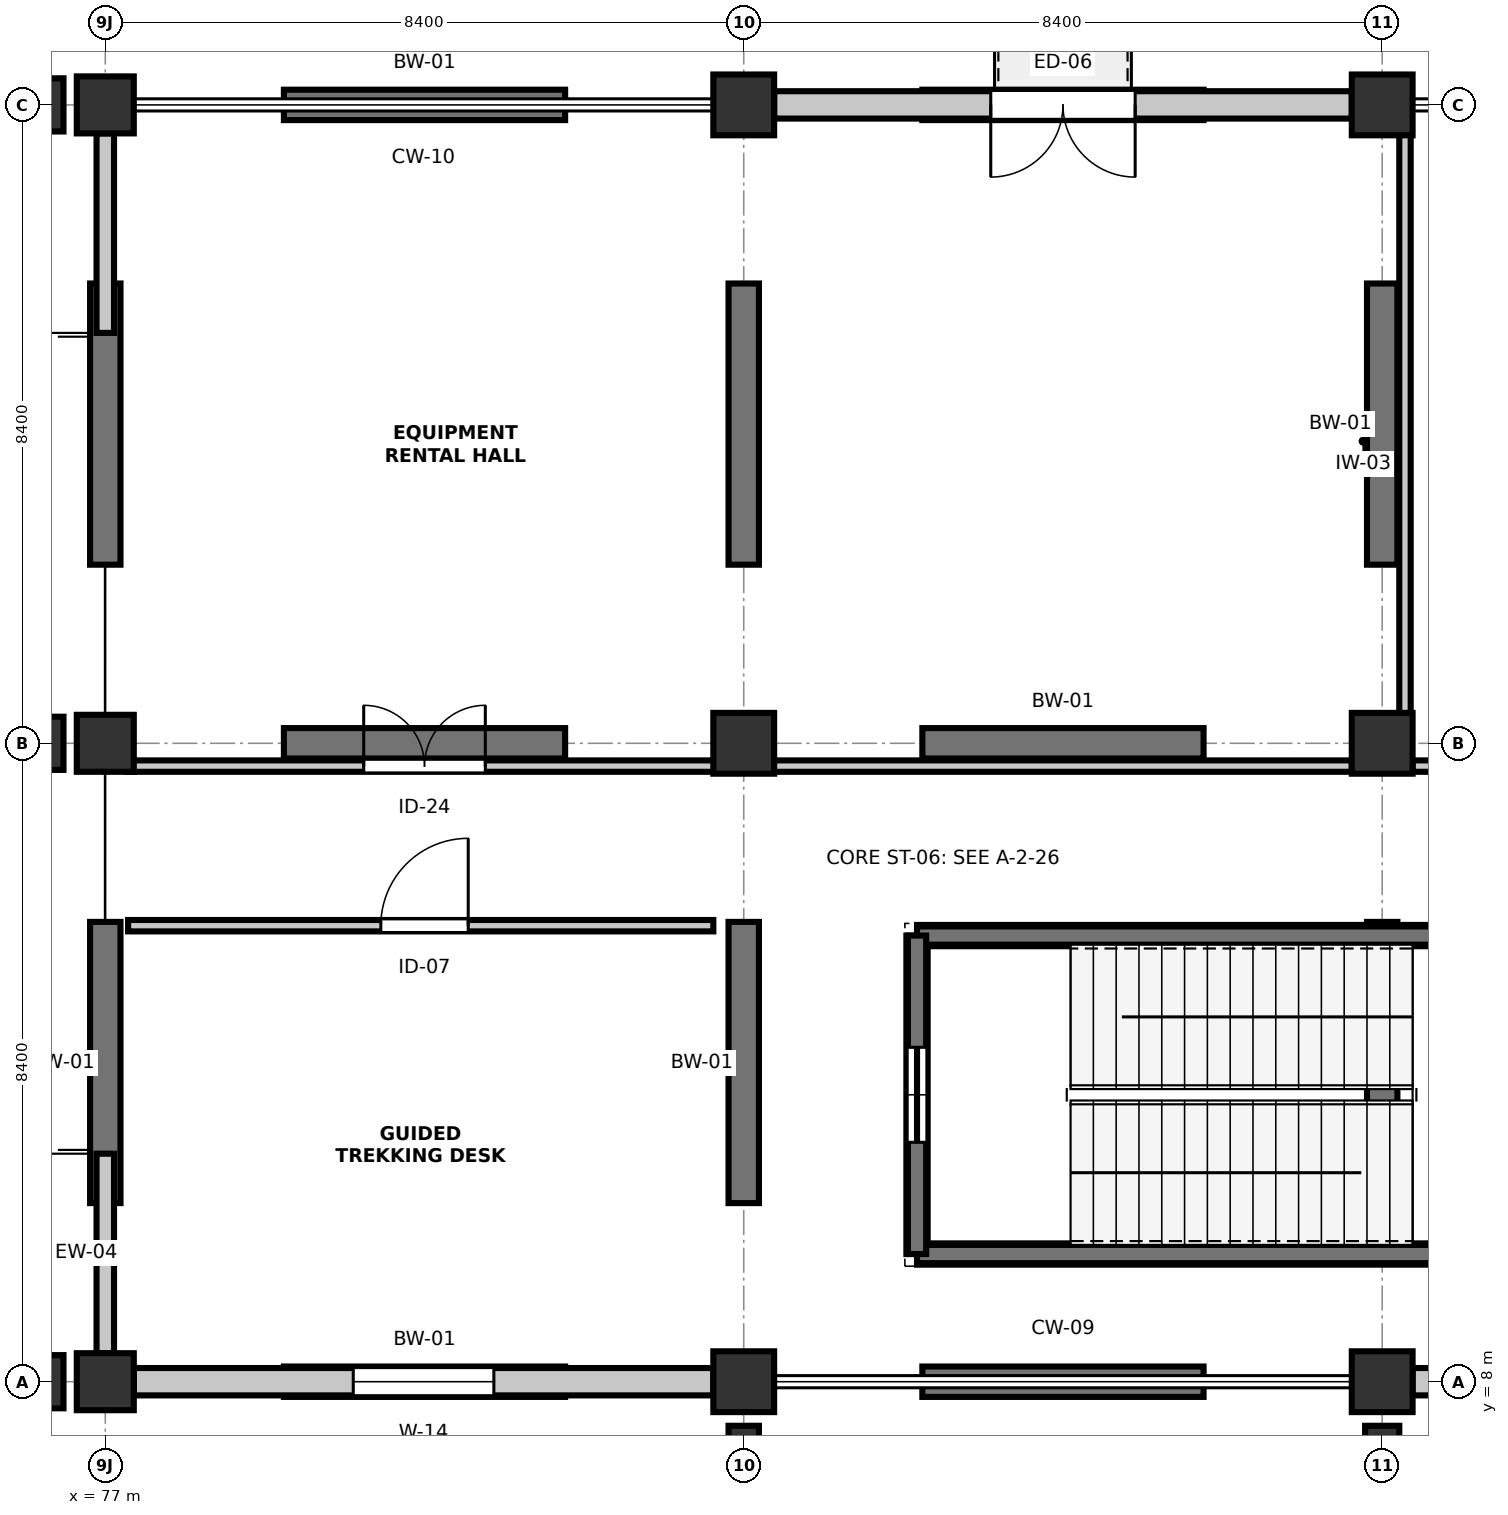
"""IFC4 building model, lengths in metres.
Left out: names, types, materials, properties, quantities, classifications, styles, units other than length and angle.
Written with IfcOpenShell. Run it as: python <this file> out.ifc"""

import sys

from ifc_helpers import new_model, si_unit, direction, frame, frame_2d, origin, origin_2d, place, context, subcontext, project, spatial, rectangle, extrude, element, fill, save


model = new_model("IFC4")
c1 = context("Model", 3, precision=1e-05, world=origin(), true_north=direction((0.0, 1.0)))
c2 = subcontext(c1, "Body", "Model", "MODEL_VIEW")
j1 = project(units=[si_unit("LENGTHUNIT", "METRE"), si_unit("PLANEANGLEUNIT", "RADIAN")], contexts=[c1])
p1 = place(None, origin())
s1 = spatial("IfcSite", under=j1, at=p1, CompositionType="ELEMENT")
p2 = place(p1, origin())
s2 = spatial("IfcBuilding", under=s1, at=p2, CompositionType="ELEMENT")
p3 = place(p2, frame((0.0, 0.0, 4.8)))
s3 = spatial("IfcBuildingStorey", under=s2, at=p3, CompositionType="ELEMENT", Elevation=4.8)
for number, where, z_axis, x_axis in (
    (1, (76.1, 8.0, 0.0), (0.0, 0.0, 1.0), (1.0, 0.0, 0.0)),
    (2, (76.1, 16.4, 0.0), (0.0, 0.0, 1.0), (1.0, 0.0, 0.0)),
    (3, (76.1, 24.8, 0.0), (0.0, 0.0, 1.0), (1.0, 0.0, 0.0)),
):
    element("IfcColumn", number, at=place(p3, frame(where, z_axis=z_axis, x_axis=x_axis)), inside=s3, PredefinedType="COLUMN", context=c2, shape_type="SweptSolid", body=[
        extrude(rectangle(XDim=0.7, YDim=0.7, at=origin_2d()), origin(), (0.0, 0.0, 1.0), 4.8),
    ])
for number, where, z_axis, x_axis in (
    (4, (77.0, 8.0, 0.0), (0.0, 0.0, 1.0), (1.0, 0.0, 0.0)),
    (5, (77.0, 16.4, 0.0), (0.0, 0.0, 1.0), (1.0, 0.0, 0.0)),
    (6, (77.0, 24.8, 0.0), (0.0, 0.0, 1.0), (1.0, 0.0, 0.0)),
):
    element("IfcColumn", number, at=place(p3, frame(where, z_axis=z_axis, x_axis=x_axis)), inside=s3, PredefinedType="COLUMN", context=c2, shape_type="SweptSolid", body=[
        extrude(rectangle(XDim=0.75, YDim=0.75, at=origin_2d()), origin(), (0.0, 0.0, 1.0), 4.8),
    ])
p4 = place(p3, frame((85.4, 8.0, 0.0), z_axis=(0.0, 0.0, 1.0), x_axis=(1.0, 0.0, 0.0)))
e7 = element("IfcColumn", 7, at=p4, inside=s3, PredefinedType="COLUMN", context=c2, shape_type="SweptSolid", body=[
    extrude(rectangle(XDim=0.8, YDim=0.8, at=origin_2d()), origin(), (0.0, 0.0, 1.0), 4.8),
])
p5 = place(p3, frame((85.4, 7.095, 0.0), z_axis=(0.0, 0.0, 1.0), x_axis=(1.0, 0.0, 0.0)))
e8 = element("IfcColumn", 8, at=p5, inside=s3, PredefinedType="PILASTER", context=c2, shape_type="SweptSolid", body=[
    extrude(rectangle(XDim=0.4, YDim=0.65, at=origin_2d()), origin(), (0.0, 0.0, 1.0), 4.8),
])
for number, where, z_axis, x_axis in (
    (9, (85.4, 16.4, 0.0), (0.0, 0.0, 1.0), (1.0, 0.0, 0.0)),
    (10, (85.4, 24.8, 0.0), (0.0, 0.0, 1.0), (1.0, 0.0, 0.0)),
    (11, (93.8, 8.0, 0.0), (0.0, 0.0, 1.0), (1.0, 0.0, 0.0)),
):
    element("IfcColumn", number, at=place(p3, frame(where, z_axis=z_axis, x_axis=x_axis)), inside=s3, PredefinedType="COLUMN", context=c2, shape_type="SweptSolid", body=[
        extrude(rectangle(XDim=0.8, YDim=0.8, at=origin_2d()), origin(), (0.0, 0.0, 1.0), 4.8),
    ])
p6 = place(p3, frame((93.8, 7.045, 0.0), z_axis=(0.0, 0.0, 1.0), x_axis=(1.0, 0.0, 0.0)))
e12 = element("IfcColumn", 12, at=p6, inside=s3, PredefinedType="PILASTER", context=c2, shape_type="SweptSolid", body=[
    extrude(rectangle(XDim=0.45, YDim=0.75, at=origin_2d()), origin(), (0.0, 0.0, 1.0), 4.8),
])
for number, where, z_axis, x_axis in (
    (13, (93.8, 16.4, 0.0), (0.0, 0.0, 1.0), (1.0, 0.0, 0.0)),
    (14, (93.8, 24.8, 0.0), (0.0, 0.0, 1.0), (1.0, 0.0, 0.0)),
):
    element("IfcColumn", number, at=place(p3, frame(where, z_axis=z_axis, x_axis=x_axis)), inside=s3, PredefinedType="COLUMN", context=c2, shape_type="SweptSolid", body=[
        extrude(rectangle(XDim=0.8, YDim=0.8, at=origin_2d()), origin(), (0.0, 0.0, 1.0), 4.8),
    ])
for number, where, z_axis, x_axis in (
    (15, (79.35, 8.0, -2.1), (0.0, 0.0, 1.0), (1.0, 0.0, 0.0)),
    (16, (87.75, 8.0, -2.1), (0.0, 0.0, 1.0), (1.0, 0.0, 0.0)),
    (17, (79.35, 16.4, -2.1), (0.0, 0.0, 1.0), (1.0, 0.0, 0.0)),
    (18, (87.75, 16.4, -2.1), (0.0, 0.0, 1.0), (1.0, 0.0, 0.0)),
    (19, (79.35, 24.8, -2.1), (0.0, 0.0, 1.0), (1.0, 0.0, 0.0)),
    (20, (87.75, 24.8, -2.1), (0.0, 0.0, 1.0), (1.0, 0.0, 0.0)),
    (21, (77.0, 10.35, -2.1), (0.0, 0.0, 1.0), (0.0, 1.0, 0.0)),
    (22, (77.0, 18.75, -2.1), (0.0, 0.0, 1.0), (0.0, 1.0, 0.0)),
    (23, (85.4, 10.35, -2.1), (0.0, 0.0, 1.0), (0.0, 1.0, 0.0)),
    (24, (85.4, 18.75, -2.1), (0.0, 0.0, 1.0), (0.0, 1.0, 0.0)),
):
    element("IfcWall", number, at=place(p3, frame(where, z_axis=z_axis, x_axis=x_axis)), inside=s3, PredefinedType="SOLIDWALL", context=c2, shape_type="SweptSolid", body=[
        extrude(rectangle(XDim=3.7, YDim=0.4, at=frame_2d((1.85, 0.0))), origin(), (0.0, 0.0, 1.0), 1.85),
    ])
p7 = place(p3, frame((93.8, 9.82, -2.1), z_axis=(0.0, 0.0, 1.0), x_axis=(0.0, 1.0, 0.0)))
e25 = element("IfcWall", 25, at=p7, inside=s3, PredefinedType="SOLIDWALL", context=c2, shape_type="SweptSolid", body=[
    extrude(rectangle(XDim=4.23, YDim=0.4, at=frame_2d((2.115, 0.0))), origin(), (0.0, 0.0, 1.0), 1.85),
])
p8 = place(p3, frame((93.8, 18.75, -2.1), z_axis=(0.0, 0.0, 1.0), x_axis=(0.0, 1.0, 0.0)))
e26 = element("IfcWall", 26, at=p8, inside=s3, PredefinedType="SOLIDWALL", context=c2, shape_type="SweptSolid", body=[
    extrude(rectangle(XDim=3.7, YDim=0.4, at=frame_2d((1.85, 0.0))), origin(), (0.0, 0.0, 1.0), 1.85),
])
for number, where, z_axis, x_axis in (
    (27, (87.68, 9.68, -2.1), (0.0, 0.0, 1.0), (1.0, 0.0, 0.0)),
    (28, (96.22, 13.87, -2.1), (0.0, 0.0, 1.0), (-1.0, 0.0, 0.0)),
):
    element("IfcWall", number, at=place(p3, frame(where, z_axis=z_axis, x_axis=x_axis)), inside=s3, PredefinedType="SOLIDWALL", context=c2, shape_type="SweptSolid", body=[
        extrude(rectangle(XDim=8.54, YDim=0.28, at=frame_2d((4.27, 0.0))), origin(), (0.0, 0.0, 1.0), 1.8),
    ])
p9 = place(p3, frame((87.68, 13.87, -2.1), z_axis=(0.0, 0.0, 1.0), x_axis=(0.0, -1.0, 0.0)))
e29 = element("IfcWall", 29, at=p9, inside=s3, PredefinedType="SOLIDWALL", context=c2, shape_type="SweptSolid", body=[
    extrude(rectangle(XDim=4.19, YDim=0.28, at=frame_2d((2.095, 0.0))), origin(), (0.0, 0.0, 1.0), 1.8),
])
p10 = place(p3, frame((77.375, 8.0, 0.0), z_axis=(0.0, 0.0, 1.0), x_axis=(1.0, 0.0, 0.0)))
e30 = element("IfcWall", 30, at=p10, inside=s3, PredefinedType="STANDARD", context=c2, shape_type="SweptSolid", body=[
    extrude(rectangle(XDim=7.625, YDim=0.36, at=frame_2d((3.812, 0.0))), origin(), (0.0, 0.0, 1.0), 3.785),
])
p11 = place(p10, frame((2.887, 0.0, 0.95)))
e31 = element("IfcOpeningElement", 31, at=p11, cuts=e30, PredefinedType="OPENING", context=c2, shape_type="SweptSolid", body=[
    extrude(rectangle(XDim=1.85, YDim=1.7, at=frame_2d((0.925, 0.85))), frame((0.0, 0.19, 0.0), z_axis=(0.0, -1.0, 0.0), x_axis=(1.0, 0.0, 0.0)), (0.0, 0.0, 1.0), 0.38),
])
p12 = place(p3, frame((94.2, 8.0, 0.0), z_axis=(0.0, 0.0, 1.0), x_axis=(1.0, 0.0, 0.0)))
e32 = element("IfcWall", 32, at=p12, inside=s3, PredefinedType="STANDARD", context=c2, shape_type="SweptSolid", body=[
    extrude(rectangle(XDim=7.6, YDim=0.36, at=frame_2d((3.8, 0.0))), origin(), (0.0, 0.0, 1.0), 3.785),
])
p13 = place(p12, frame((2.875, 0.0, 0.95)))
e33 = element("IfcOpeningElement", 33, at=p13, cuts=e32, PredefinedType="OPENING", context=c2, shape_type="SweptSolid", body=[
    extrude(rectangle(XDim=1.85, YDim=1.95, at=frame_2d((0.925, 0.975))), frame((0.0, 0.19, 0.0), z_axis=(0.0, -1.0, 0.0), x_axis=(1.0, 0.0, 0.0)), (0.0, 0.0, 1.0), 0.38),
])
p14 = place(p3, frame((93.4, 24.8, 0.0), z_axis=(0.0, 0.0, 1.0), x_axis=(-1.0, 0.0, 0.0)))
e34 = element("IfcWall", 34, at=p14, inside=s3, PredefinedType="STANDARD", context=c2, shape_type="SweptSolid", body=[
    extrude(rectangle(XDim=7.6, YDim=0.36, at=frame_2d((3.8, 0.0))), origin(), (0.0, 0.0, 1.0), 3.785),
])
p15 = place(p14, frame((2.85, 0.0, 0.0)))
e35 = element("IfcOpeningElement", 35, at=p15, cuts=e34, PredefinedType="OPENING", context=c2, shape_type="SweptSolid", body=[
    extrude(rectangle(XDim=1.9, YDim=2.3, at=frame_2d((0.95, 1.15))), frame((0.0, 0.19, 0.0), z_axis=(0.0, -1.0, 0.0), x_axis=(1.0, 0.0, 0.0)), (0.0, 0.0, 1.0), 0.38),
])
for number, where, z_axis, x_axis in (
    (36, (77.0, 8.375, 0.0), (0.0, 0.0, 1.0), (0.0, 1.0, 0.0)),
    (37, (77.0, 21.8, 0.0), (0.0, 0.0, 1.0), (0.0, 1.0, 0.0)),
):
    element("IfcWall", number, at=place(p3, frame(where, z_axis=z_axis, x_axis=x_axis)), inside=s3, PredefinedType="STANDARD", context=c2, shape_type="SweptSolid", body=[
        extrude(rectangle(XDim=2.625, YDim=0.23, at=frame_2d((1.312, 0.0))), origin(), (0.0, 0.0, 1.0), 3.785),
    ])
for number, where, z_axis, x_axis in (
    (38, (87.68, 9.68, 0.0), (0.0, 0.0, 1.0), (1.0, 0.0, 0.0)),
    (39, (96.22, 13.87, 0.0), (0.0, 0.0, 1.0), (-1.0, 0.0, 0.0)),
):
    element("IfcWall", number, at=place(p3, frame(where, z_axis=z_axis, x_axis=x_axis)), inside=s3, PredefinedType="SHEAR", context=c2, shape_type="SweptSolid", body=[
        extrude(rectangle(XDim=8.54, YDim=0.24, at=frame_2d((4.27, 0.0))), origin(), (0.0, 0.0, 1.0), 4.55),
    ])
p16 = place(p3, frame((87.68, 13.87, 0.0), z_axis=(0.0, 0.0, 1.0), x_axis=(0.0, -1.0, 0.0)))
e40 = element("IfcWall", 40, at=p16, inside=s3, PredefinedType="SHEAR", context=c2, shape_type="SweptSolid", body=[
    extrude(rectangle(XDim=4.19, YDim=0.24, at=frame_2d((2.095, 0.0))), origin(), (0.0, 0.0, 1.0), 4.55),
])
p17 = place(p16, frame((1.47, 0.0, 0.0)))
e41 = element("IfcOpeningElement", 41, at=p17, cuts=e40, PredefinedType="OPENING", context=c2, shape_type="SweptSolid", body=[
    extrude(rectangle(XDim=1.25, YDim=2.2, at=frame_2d((0.625, 1.1))), frame((0.0, 0.13, 0.0), z_axis=(0.0, -1.0, 0.0), x_axis=(1.0, 0.0, 0.0)), (0.0, 0.0, 1.0), 0.26),
])
p18 = place(p3, frame((77.3, 16.1, 0.0), z_axis=(0.0, 0.0, 1.0), x_axis=(1.0, 0.0, 0.0)))
e42 = element("IfcWall", 42, at=p18, inside=s3, PredefinedType="PARTITIONING", context=c2, shape_type="SweptSolid", body=[
    extrude(rectangle(XDim=16.1, YDim=0.15, at=frame_2d((8.05, 0.0))), origin(), (0.0, 0.0, 1.0), 3.685),
])
p19 = place(p18, frame((3.1, 0.0, 0.0)))
e43 = element("IfcOpeningElement", 43, at=p19, cuts=e42, PredefinedType="OPENING", context=c2, shape_type="SweptSolid", body=[
    extrude(rectangle(XDim=1.6, YDim=2.28, at=frame_2d((0.8, 1.14))), frame((0.0, 0.085, 0.0), z_axis=(0.0, -1.0, 0.0), x_axis=(1.0, 0.0, 0.0)), (0.0, 0.0, 1.0), 0.17),
])
p20 = place(p3, frame((94.2, 16.1, 0.0), z_axis=(0.0, 0.0, 1.0), x_axis=(1.0, 0.0, 0.0)))
e44 = element("IfcWall", 44, at=p20, inside=s3, PredefinedType="PARTITIONING", context=c2, shape_type="SweptSolid", body=[
    extrude(rectangle(XDim=16.1, YDim=0.15, at=frame_2d((8.05, 0.0))), origin(), (0.0, 0.0, 1.0), 3.685),
])
p21 = place(p20, frame((3.0, 0.0, 0.0)))
e45 = element("IfcOpeningElement", 45, at=p21, cuts=e44, PredefinedType="OPENING", context=c2, shape_type="SweptSolid", body=[
    extrude(rectangle(XDim=1.6, YDim=2.28, at=frame_2d((0.8, 1.14))), frame((0.0, 0.085, 0.0), z_axis=(0.0, -1.0, 0.0), x_axis=(1.0, 0.0, 0.0)), (0.0, 0.0, 1.0), 0.17),
])
p22 = place(p3, frame((94.1, 16.25, 0.0), z_axis=(0.0, 0.0, 1.0), x_axis=(0.0, 1.0, 0.0)))
e46 = element("IfcWall", 46, at=p22, inside=s3, PredefinedType="PARTITIONING", context=c2, shape_type="SweptSolid", body=[
    extrude(rectangle(XDim=8.25, YDim=0.15, at=frame_2d((4.125, 0.0))), origin(), (0.0, 0.0, 1.0), 4.135),
])
p23 = place(p3, frame((77.3, 14.0, 0.0), z_axis=(0.0, 0.0, 1.0), x_axis=(1.0, 0.0, 0.0)))
e47 = element("IfcWall", 47, at=p23, inside=s3, PredefinedType="PARTITIONING", context=c2, shape_type="SweptSolid", body=[
    extrude(rectangle(XDim=7.7, YDim=0.15, at=frame_2d((3.85, 0.0))), origin(), (0.0, 0.0, 1.0), 4.535),
])
p24 = place(p23, frame((3.325, 0.0, 0.0)))
e48 = element("IfcOpeningElement", 48, at=p24, cuts=e47, PredefinedType="OPENING", context=c2, shape_type="SweptSolid", body=[
    extrude(rectangle(XDim=1.15, YDim=2.15, at=frame_2d((0.575, 1.075))), frame((0.0, 0.085, 0.0), z_axis=(0.0, -1.0, 0.0), x_axis=(1.0, 0.0, 0.0)), (0.0, 0.0, 1.0), 0.17),
])
p25 = place(p11, origin())
e49 = element("IfcWindow", 49, at=p25, inside=s3, PartitioningType="SINGLE_PANEL", PredefinedType="WINDOW", context=c2, shape_type="SweptSolid", body=[
    extrude(rectangle(XDim=1.85, YDim=1.7, at=frame_2d((0.925, 0.85))), frame((0.0, 0.03, 0.0), z_axis=(0.0, -1.0, 0.0), x_axis=(1.0, 0.0, 0.0)), (0.0, 0.0, 1.0), 0.06),
])
fill(e31, e49)
p26 = place(p15, origin())
e50 = element("IfcDoor", 50, at=p26, inside=s3, OperationType="DOUBLE_DOOR_SINGLE_SWING", PredefinedType="DOOR", context=c2, shape_type="SweptSolid", body=[
    extrude(rectangle(XDim=1.9, YDim=2.3, at=frame_2d((0.95, 1.15))), frame((0.0, 0.025, 0.0), z_axis=(0.0, -1.0, 0.0), x_axis=(1.0, 0.0, 0.0)), (0.0, 0.0, 1.0), 0.05),
])
fill(e35, e50)
p27 = place(p17, origin())
e51 = element("IfcDoor", 51, at=p27, inside=s3, OperationType="SINGLE_SWING_RIGHT", PredefinedType="DOOR", context=c2, shape_type="SweptSolid", body=[
    extrude(rectangle(XDim=1.25, YDim=2.2, at=frame_2d((0.625, 1.1))), frame((0.0, 0.025, 0.0), z_axis=(0.0, -1.0, 0.0), x_axis=(1.0, 0.0, 0.0)), (0.0, 0.0, 1.0), 0.05),
])
fill(e41, e51)
p28 = place(p19, origin())
e52 = element("IfcDoor", 52, at=p28, inside=s3, OperationType="DOUBLE_DOOR_SINGLE_SWING", PredefinedType="DOOR", context=c2, shape_type="SweptSolid", body=[
    extrude(rectangle(XDim=1.6, YDim=2.28, at=frame_2d((0.8, 1.14))), frame((0.0, 0.025, 0.0), z_axis=(0.0, -1.0, 0.0), x_axis=(1.0, 0.0, 0.0)), (0.0, 0.0, 1.0), 0.05),
])
fill(e43, e52)
p29 = place(p24, origin())
e53 = element("IfcDoor", 53, at=p29, inside=s3, OperationType="SINGLE_SWING_RIGHT", PredefinedType="DOOR", context=c2, shape_type="SweptSolid", body=[
    extrude(rectangle(XDim=1.15, YDim=2.15, at=frame_2d((0.575, 1.075))), frame((0.0, 0.025, 0.0), z_axis=(0.0, -1.0, 0.0), x_axis=(1.0, 0.0, 0.0)), (0.0, 0.0, 1.0), 0.05),
])
fill(e48, e53)
save(model, sys.argv[1])
